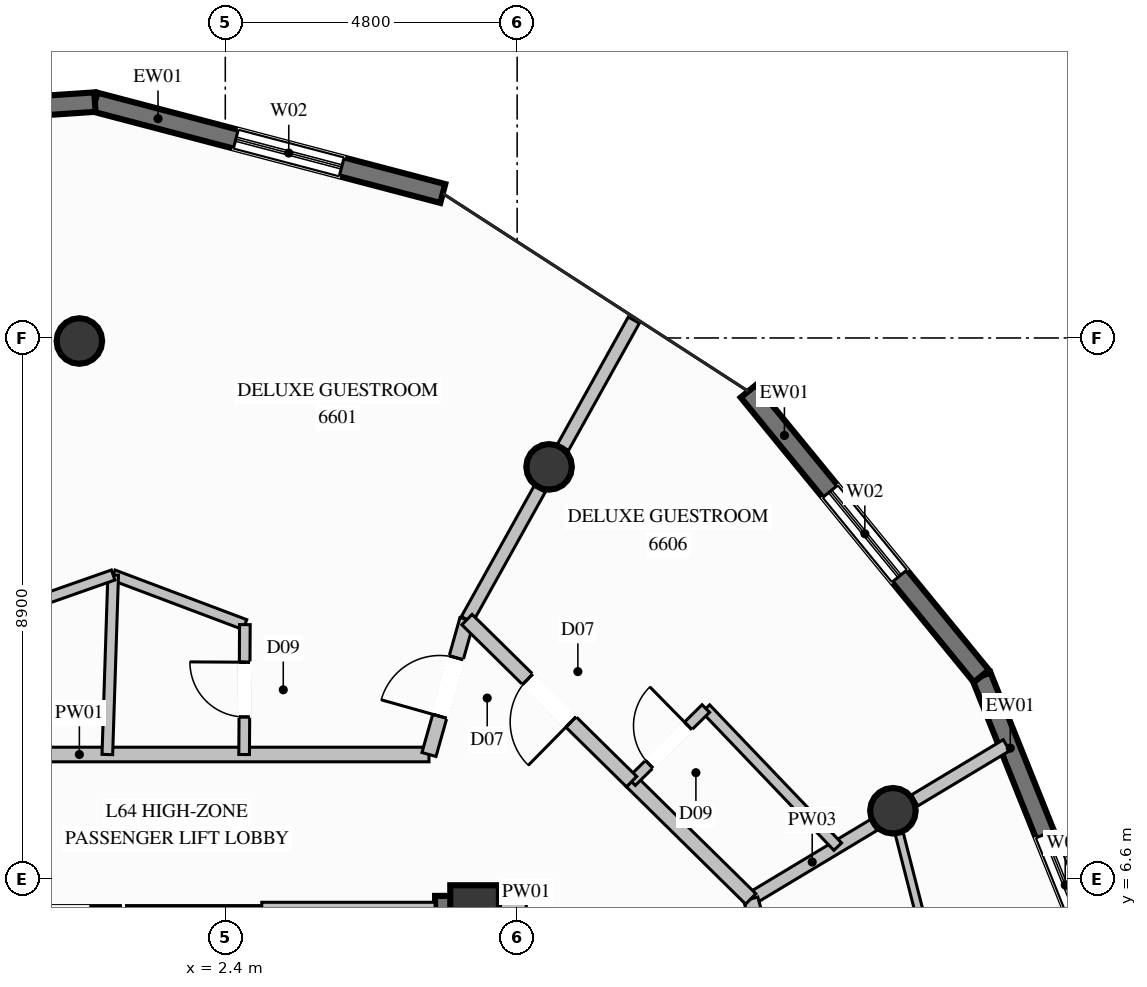
"""IFC4 building model, lengths in metres.
Left out: names, types, materials, properties, quantities, classifications, styles, units other than length and angle.
Written with IfcOpenShell. Run it as: python <this file> out.ifc"""

import sys

from ifc_helpers import new_model, si_unit, direction, frame, frame_2d, origin, origin_2d, place, context, subcontext, project, spatial, rectangle, circle, extrude, element, fill, save


model = new_model("IFC4")
c1 = context("Model", 3, precision=1e-05, world=origin(), true_north=direction((0.0, 1.0)))
c2 = subcontext(c1, "Body", "Model", "MODEL_VIEW")
j1 = project(units=[si_unit("LENGTHUNIT", "METRE"), si_unit("PLANEANGLEUNIT", "RADIAN")], contexts=[c1])
p1 = place(None, origin())
s1 = spatial("IfcSite", under=j1, at=p1, CompositionType="ELEMENT")
p2 = place(p1, origin())
s2 = spatial("IfcBuilding", under=s1, at=p2, CompositionType="ELEMENT")
p3 = place(p2, frame((0.0, 0.0, 246.8)))
s3 = spatial("IfcBuildingStorey", under=s2, at=p3, CompositionType="ELEMENT", Elevation=246.8)
p4 = place(p3, frame((6.5, 6.1, 0.0), z_axis=(0.0, 0.0, 1.0), x_axis=(1.0, 0.0, 0.0)))
e1 = element("IfcColumn", 1, at=p4, inside=s3, PredefinedType="COLUMN", context=c2, shape_type="SweptSolid", body=[
    extrude(rectangle(XDim=0.8, YDim=0.8, at=origin_2d()), origin(), (0.0, 0.0, 1.0), 3.8),
])
p5 = place(p3, frame((5.85, 6.1, 0.0), z_axis=(0.0, 0.0, 1.0), x_axis=(1.0, 0.0, 0.0)))
e2 = element("IfcWall", 2, at=p5, inside=s3, PredefinedType="SHEAR", context=c2, shape_type="SweptSolid", body=[
    extrude(rectangle(XDim=0.425, YDim=0.45, at=frame_2d((0.212, 0.0))), origin(), (0.0, 0.0, 1.0), 3.8),
])
p6 = place(p3, frame((6.5, 3.35, 0.0), z_axis=(0.0, 0.0, 1.0), x_axis=(0.0, 1.0, 0.0)))
e3 = element("IfcWall", 3, at=p6, inside=s3, PredefinedType="SHEAR", context=c2, shape_type="SweptSolid", body=[
    extrude(rectangle(XDim=2.975, YDim=0.45, at=frame_2d((1.487, 0.0))), origin(), (0.0, 0.0, 1.0), 3.8),
])
for number, where, z_axis, x_axis in (
    (4, (13.38, 7.725, 0.0), (0.0, 0.0, 1.0), (1.0, 0.0, 0.0)),
    (5, (7.725, 13.38, 0.0), (0.0, 0.0, 1.0), (1.0, 0.0, 0.0)),
    (6, (0.0, 15.45, 0.0), (0.0, 0.0, 1.0), (1.0, 0.0, 0.0)),
):
    element("IfcColumn", number, at=place(p3, frame(where, z_axis=z_axis, x_axis=x_axis)), inside=s3, PredefinedType="COLUMN", context=c2, shape_type="SweptSolid", body=[
        extrude(circle(Radius=0.375, at=origin_2d()), origin(), (0.0, 0.0, 1.0), 3.8),
    ])
p7 = place(p3, frame((14.835, 9.939, 0.0), z_axis=(0.0, 0.0, 1.0), x_axis=(0.372412492589, -0.928067311871, 0.0)))
e7 = element("IfcWall", 7, at=p7, inside=s3, PredefinedType="SOLIDWALL", context=c2, shape_type="SweptSolid", body=[
    extrude(rectangle(XDim=6.095, YDim=0.32, at=frame_2d((3.048, 0.0))), origin(), (0.0, 0.0, 1.0), 3.57),
])
p8 = place(p7, frame((2.802, 0.0, 0.35)))
e8 = element("IfcOpeningElement", 8, at=p8, cuts=e7, PredefinedType="OPENING", context=c2, shape_type="SweptSolid", body=[
    extrude(rectangle(XDim=1.8, YDim=2.6, at=frame_2d((0.9, 1.3))), frame((0.0, 0.17, 0.0), z_axis=(0.0, -1.0, 0.0), x_axis=(1.0, 0.0, 0.0)), (0.0, 0.0, 1.0), 0.34),
])
p9 = place(p3, frame((11.001, 14.623, 0.0), z_axis=(0.0, 0.0, 1.0), x_axis=(0.633391522875, -0.773831492478, 0.0)))
e9 = element("IfcWall", 9, at=p9, inside=s3, PredefinedType="SOLIDWALL", context=c2, shape_type="SweptSolid", body=[
    extrude(rectangle(XDim=6.053, YDim=0.32, at=frame_2d((3.027, 0.0))), origin(), (0.0, 0.0, 1.0), 3.57),
])
p10 = place(p9, frame((2.127, 0.0, 0.35)))
e10 = element("IfcOpeningElement", 10, at=p10, cuts=e9, PredefinedType="OPENING", context=c2, shape_type="SweptSolid", body=[
    extrude(rectangle(XDim=1.8, YDim=2.6, at=frame_2d((0.9, 1.3))), frame((0.0, 0.17, 0.0), z_axis=(0.0, -1.0, 0.0), x_axis=(1.0, 0.0, 0.0)), (0.0, 0.0, 1.0), 0.34),
])
p11 = place(p3, frame((0.256, 19.379, 0.0), z_axis=(0.0, 0.0, 1.0), x_axis=(0.967181914063, -0.254084917124, 0.0)))
e11 = element("IfcWall", 11, at=p11, inside=s3, PredefinedType="SOLIDWALL", context=c2, shape_type="SweptSolid", body=[
    extrude(rectangle(XDim=5.915, YDim=0.32, at=frame_2d((2.958, 0.0))), origin(), (0.0, 0.0, 1.0), 3.57),
])
p12 = place(p11, frame((2.396, 0.0, 0.35)))
e12 = element("IfcOpeningElement", 12, at=p12, cuts=e11, PredefinedType="OPENING", context=c2, shape_type="SweptSolid", body=[
    extrude(rectangle(XDim=1.8, YDim=2.6, at=frame_2d((0.9, 1.3))), frame((0.0, 0.17, 0.0), z_axis=(0.0, -1.0, 0.0), x_axis=(1.0, 0.0, 0.0)), (0.0, 0.0, 1.0), 0.34),
])
p13 = place(p3, frame((-5.603, 18.985, 0.0), z_axis=(0.0, 0.0, 1.0), x_axis=(0.997748955427, 0.067059838539, 0.0)))
e13 = element("IfcWall", 13, at=p13, inside=s3, PredefinedType="SOLIDWALL", context=c2, shape_type="SweptSolid", body=[
    extrude(rectangle(XDim=5.872, YDim=0.32, at=frame_2d((2.936, 0.0))), origin(), (0.0, 0.0, 1.0), 3.57),
])
p14 = place(p13, frame((2.036, 0.0, 0.35)))
e14 = element("IfcOpeningElement", 14, at=p14, cuts=e13, PredefinedType="OPENING", context=c2, shape_type="SweptSolid", body=[
    extrude(rectangle(XDim=1.8, YDim=2.6, at=frame_2d((0.9, 1.3))), frame((0.0, 0.17, 0.0), z_axis=(0.0, -1.0, 0.0), x_axis=(1.0, 0.0, 0.0)), (0.0, 0.0, 1.0), 0.34),
])
p15 = place(p3, frame((0.65, 6.0, 0.0), z_axis=(0.0, 0.0, 1.0), x_axis=(-1.0, 0.0, 0.0)))
e15 = element("IfcWall", 15, at=p15, inside=s3, PredefinedType="SOLIDWALL", context=c2, shape_type="SweptSolid", body=[
    extrude(rectangle(XDim=2.1, YDim=0.28, at=frame_2d((1.05, 0.0))), origin(), (0.0, 0.0, 1.0), 3.57),
])
p16 = place(p15, frame((0.5, 0.0, 0.0)))
e16 = element("IfcOpeningElement", 16, at=p16, cuts=e15, PredefinedType="OPENING", context=c2, shape_type="SweptSolid", body=[
    extrude(rectangle(XDim=1.1, YDim=2.2, at=frame_2d((0.55, 1.1))), frame((0.0, 0.15, 0.0), z_axis=(0.0, -1.0, 0.0), x_axis=(1.0, 0.0, 0.0)), (0.0, 0.0, 1.0), 0.3),
])
p17 = place(p3, frame((3.0, 6.0, 0.0), z_axis=(0.0, 0.0, 1.0), x_axis=(-1.0, 0.0, 0.0)))
e17 = element("IfcWall", 17, at=p17, inside=s3, PredefinedType="SOLIDWALL", context=c2, shape_type="SweptSolid", body=[
    extrude(rectangle(XDim=2.2, YDim=0.28, at=frame_2d((1.1, 0.0))), origin(), (0.0, 0.0, 1.0), 3.57),
])
p18 = place(p3, frame((-5.75, 8.65, 0.0), z_axis=(0.0, 0.0, 1.0), x_axis=(1.0, 0.0, 0.0)))
e18 = element("IfcWall", 18, at=p18, inside=s3, PredefinedType="PARTITIONING", context=c2, shape_type="SweptSolid", body=[
    extrude(rectangle(XDim=11.5, YDim=0.24, at=frame_2d((5.75, 0.0))), origin(), (0.0, 0.0, 1.0), 3.57),
])
p19 = place(p3, frame((3.0, 6.1, 0.0), z_axis=(0.0, 0.0, 1.0), x_axis=(1.0, 0.0, 0.0)))
e19 = element("IfcWall", 19, at=p19, inside=s3, PredefinedType="PARTITIONING", context=c2, shape_type="SweptSolid", body=[
    extrude(rectangle(XDim=2.85, YDim=0.24, at=frame_2d((1.425, 0.0))), origin(), (0.0, 0.0, 1.0), 2.655),
])
p20 = place(p3, frame((6.5, 6.1, 0.0), z_axis=(0.0, 0.0, 1.0), x_axis=(1.0, 0.0, 0.0)))
e20 = element("IfcWall", 20, at=p20, inside=s3, PredefinedType="PARTITIONING", context=c2, shape_type="SweptSolid", body=[
    extrude(rectangle(XDim=0.85, YDim=0.24, at=frame_2d((0.425, 0.0))), origin(), (0.0, 0.0, 1.0), 3.011),
])
p21 = place(p3, frame((11.042, 6.275, 0.0), z_axis=(0.0, 0.0, 1.0), x_axis=(0.857026686246, 0.515272024335, 0.0)))
e21 = element("IfcWall", 21, at=p21, inside=s3, PredefinedType="PARTITIONING", context=c2, shape_type="SweptSolid", body=[
    extrude(rectangle(XDim=2.358, YDim=0.21, at=frame_2d((1.179, 0.0))), origin(), (0.0, 0.0, 1.0), 3.011),
])
p22 = place(p3, frame((13.737, 7.895, 0.0), z_axis=(0.0, 0.0, 1.0), x_axis=(0.857150569961, 0.515065918514, 0.0)))
e22 = element("IfcWall", 22, at=p22, inside=s3, PredefinedType="PARTITIONING", context=c2, shape_type="SweptSolid", body=[
    extrude(rectangle(XDim=1.763, YDim=0.21, at=frame_2d((0.881, 0.0))), origin(), (0.0, 0.0, 1.0), 3.57),
])
p23 = place(p3, frame((6.375, 10.869, 0.0), z_axis=(0.0, 0.0, 1.0), x_axis=(0.486620940413, 0.873613221255, 0.0)))
e23 = element("IfcWall", 23, at=p23, inside=s3, PredefinedType="PARTITIONING", context=c2, shape_type="SweptSolid", body=[
    extrude(rectangle(XDim=2.458, YDim=0.21, at=frame_2d((1.229, 0.0))), origin(), (0.0, 0.0, 1.0), 3.011),
])
p24 = place(p3, frame((7.954, 13.702, 0.0), z_axis=(0.0, 0.0, 1.0), x_axis=(0.486456485885, 0.873704805607, 0.0)))
e24 = element("IfcWall", 24, at=p24, inside=s3, PredefinedType="PARTITIONING", context=c2, shape_type="SweptSolid", body=[
    extrude(rectangle(XDim=2.395, YDim=0.21, at=frame_2d((1.197, 0.0))), origin(), (0.0, 0.0, 1.0), 3.57),
])
p25 = place(p3, frame((0.556, 11.602, 0.0), z_axis=(0.0, 0.0, 1.0), x_axis=(0.935773181831, -0.35260254135, 0.0)))
e25 = element("IfcWall", 25, at=p25, inside=s3, PredefinedType="PLUMBINGWALL", context=c2, shape_type="SweptSolid", body=[
    extrude(rectangle(XDim=2.315, YDim=0.175, at=frame_2d((1.157, 0.0))), origin(), (0.0, 0.0, 1.0), 3.252),
])
p26 = place(p3, frame((0.556, 11.602, 0.0), z_axis=(0.0, 0.0, 1.0), x_axis=(-0.032483675207, -0.999472266171, 0.0)))
e26 = element("IfcWall", 26, at=p26, inside=s3, PredefinedType="PLUMBINGWALL", context=c2, shape_type="SweptSolid", body=[
    extrude(rectangle(XDim=2.954, YDim=0.175, at=frame_2d((1.477, 0.0))), origin(), (0.0, 0.0, 1.0), 3.57),
])
p27 = place(p3, frame((2.71, 8.65, 0.0), z_axis=(0.0, 0.0, 1.0), x_axis=(0.005600552237, 0.999984316784, 0.0)))
e27 = element("IfcWall", 27, at=p27, inside=s3, PredefinedType="PLUMBINGWALL", context=c2, shape_type="SweptSolid", body=[
    extrude(rectangle(XDim=2.136, YDim=0.175, at=frame_2d((1.068, 0.0))), origin(), (0.0, 0.0, 1.0), 3.57),
])
p28 = place(p27, frame((0.618, 0.0, 0.0)))
e28 = element("IfcOpeningElement", 28, at=p28, cuts=e27, PredefinedType="OPENING", context=c2, shape_type="SweptSolid", body=[
    extrude(rectangle(XDim=0.9, YDim=2.1, at=frame_2d((0.45, 1.05))), frame((0.0, 0.098, 0.0), z_axis=(0.0, -1.0, 0.0), x_axis=(1.0, 0.0, 0.0)), (0.0, 0.0, 1.0), 0.195),
])
p29 = place(p3, frame((5.75, 8.65, 0.0), z_axis=(0.0, 0.0, 1.0), x_axis=(0.271110513922, 0.962548226969, 0.0)))
e29 = element("IfcWall", 29, at=p29, inside=s3, PredefinedType="PARTITIONING", context=c2, shape_type="SweptSolid", body=[
    extrude(rectangle(XDim=2.305, YDim=0.24, at=frame_2d((1.153, 0.0))), origin(), (0.0, 0.0, 1.0), 3.57),
])
p30 = place(p29, frame((0.653, 0.0, 0.0)))
e30 = element("IfcOpeningElement", 30, at=p30, cuts=e29, PredefinedType="OPENING", context=c2, shape_type="SweptSolid", body=[
    extrude(rectangle(XDim=1.0, YDim=2.2, at=frame_2d((0.5, 1.1))), frame((0.0, 0.13, 0.0), z_axis=(0.0, -1.0, 0.0), x_axis=(1.0, 0.0, 0.0)), (0.0, 0.0, 1.0), 0.26),
])
p31 = place(p3, frame((-1.767, 10.786, 0.0), z_axis=(0.0, 0.0, 1.0), x_axis=(0.943463492061, 0.331476453385, 0.0)))
e31 = element("IfcWall", 31, at=p31, inside=s3, PredefinedType="PLUMBINGWALL", context=c2, shape_type="SweptSolid", body=[
    extrude(rectangle(XDim=2.462, YDim=0.175, at=frame_2d((1.231, 0.0))), origin(), (0.0, 0.0, 1.0), 3.252),
])
p32 = place(p3, frame((12.75, 0.0, 0.0), z_axis=(0.0, 0.0, 1.0), x_axis=(-0.262640884433, 0.964893655189, 0.0)))
e32 = element("IfcWall", 32, at=p32, inside=s3, PredefinedType="PARTITIONING", context=c2, shape_type="SweptSolid", body=[
    extrude(rectangle(XDim=6.503, YDim=0.24, at=frame_2d((3.251, 0.0))), origin(), (0.0, 0.0, 1.0), 3.57),
])
p33 = place(p3, frame((15.357, 0.0, 0.0), z_axis=(0.0, 0.0, 1.0), x_axis=(-0.246948201866, 0.969028681513, 0.0)))
e33 = element("IfcWall", 33, at=p33, inside=s3, PredefinedType="PARTITIONING", context=c2, shape_type="SweptSolid", body=[
    extrude(rectangle(XDim=7.937, YDim=0.135, at=frame_2d((3.968, 0.0))), origin(), (0.0, 0.0, 1.0), 3.139),
])
p34 = place(p33, frame((3.493, 0.0, 0.0)))
e34 = element("IfcOpeningElement", 34, at=p34, cuts=e33, PredefinedType="OPENING", context=c2, shape_type="SweptSolid", body=[
    extrude(rectangle(XDim=0.95, YDim=2.1, at=frame_2d((0.475, 1.05))), frame((0.0, 0.078, 0.0), z_axis=(0.0, -1.0, 0.0), x_axis=(1.0, 0.0, 0.0)), (0.0, 0.0, 1.0), 0.155),
])
p35 = place(p3, frame((11.042, 6.275, 0.0), z_axis=(0.0, 0.0, 1.0), x_axis=(-0.712677423321, 0.701491903224, 0.0)))
e35 = element("IfcWall", 35, at=p35, inside=s3, PredefinedType="PARTITIONING", context=c2, shape_type="SweptSolid", body=[
    extrude(rectangle(XDim=2.75, YDim=0.24, at=frame_2d((1.375, 0.0))), origin(), (0.0, 0.0, 1.0), 3.57),
])
p36 = place(p3, frame((12.472, 7.135, 0.0), z_axis=(0.0, 0.0, 1.0), x_axis=(-0.690671718567, 0.723168429324, 0.0)))
e36 = element("IfcWall", 36, at=p36, inside=s3, PredefinedType="PLUMBINGWALL", context=c2, shape_type="SweptSolid", body=[
    extrude(rectangle(XDim=3.14, YDim=0.175, at=frame_2d((1.57, 0.0))), origin(), (0.0, 0.0, 1.0), 3.57),
])
p37 = place(p3, frame((9.082, 8.204, 0.0), z_axis=(0.0, 0.0, 1.0), x_axis=(0.712642440828, 0.701527441751, 0.0)))
e37 = element("IfcWall", 37, at=p37, inside=s3, PredefinedType="PLUMBINGWALL", context=c2, shape_type="SweptSolid", body=[
    extrude(rectangle(XDim=1.713, YDim=0.175, at=frame_2d((0.857, 0.0))), origin(), (0.0, 0.0, 1.0), 3.57),
])
p38 = place(p37, frame((0.407, 0.0, 0.0)))
e38 = element("IfcOpeningElement", 38, at=p38, cuts=e37, PredefinedType="OPENING", context=c2, shape_type="SweptSolid", body=[
    extrude(rectangle(XDim=0.9, YDim=2.1, at=frame_2d((0.45, 1.05))), frame((0.0, 0.098, 0.0), z_axis=(0.0, -1.0, 0.0), x_axis=(1.0, 0.0, 0.0)), (0.0, 0.0, 1.0), 0.195),
])
p39 = place(p3, frame((9.082, 8.204, 0.0), z_axis=(0.0, 0.0, 1.0), x_axis=(-0.712644426178, 0.70152542494, 0.0)))
e39 = element("IfcWall", 39, at=p39, inside=s3, PredefinedType="PARTITIONING", context=c2, shape_type="SweptSolid", body=[
    extrude(rectangle(XDim=3.799, YDim=0.24, at=frame_2d((1.899, 0.0))), origin(), (0.0, 0.0, 1.0), 3.57),
])
p40 = place(p39, frame((1.399, 0.0, 0.0)))
e40 = element("IfcOpeningElement", 40, at=p40, cuts=e39, PredefinedType="OPENING", context=c2, shape_type="SweptSolid", body=[
    extrude(rectangle(XDim=1.0, YDim=2.2, at=frame_2d((0.5, 1.1))), frame((0.0, 0.13, 0.0), z_axis=(0.0, -1.0, 0.0), x_axis=(1.0, 0.0, 0.0)), (0.0, 0.0, 1.0), 0.26),
])
p41 = place(p8, origin())
e41 = element("IfcWindow", 41, at=p41, inside=s3, PartitioningType="SINGLE_PANEL", PredefinedType="WINDOW", context=c2, shape_type="SweptSolid", body=[
    extrude(rectangle(XDim=1.8, YDim=2.6, at=frame_2d((0.9, 1.3))), frame((0.0, 0.03, 0.0), z_axis=(0.0, -1.0, 0.0), x_axis=(1.0, 0.0, 0.0)), (0.0, 0.0, 1.0), 0.06),
])
fill(e8, e41)
p42 = place(p10, origin())
e42 = element("IfcWindow", 42, at=p42, inside=s3, PartitioningType="SINGLE_PANEL", PredefinedType="WINDOW", context=c2, shape_type="SweptSolid", body=[
    extrude(rectangle(XDim=1.8, YDim=2.6, at=frame_2d((0.9, 1.3))), frame((0.0, 0.03, 0.0), z_axis=(0.0, -1.0, 0.0), x_axis=(1.0, 0.0, 0.0)), (0.0, 0.0, 1.0), 0.06),
])
fill(e10, e42)
p43 = place(p12, origin())
e43 = element("IfcWindow", 43, at=p43, inside=s3, PartitioningType="SINGLE_PANEL", PredefinedType="WINDOW", context=c2, shape_type="SweptSolid", body=[
    extrude(rectangle(XDim=1.8, YDim=2.6, at=frame_2d((0.9, 1.3))), frame((0.0, 0.03, 0.0), z_axis=(0.0, -1.0, 0.0), x_axis=(1.0, 0.0, 0.0)), (0.0, 0.0, 1.0), 0.06),
])
fill(e12, e43)
p44 = place(p28, origin())
e44 = element("IfcDoor", 44, at=p44, inside=s3, OperationType="SINGLE_SWING_RIGHT", PredefinedType="DOOR", context=c2, shape_type="SweptSolid", body=[
    extrude(rectangle(XDim=0.9, YDim=2.1, at=frame_2d((0.45, 1.05))), frame((0.0, 0.025, 0.0), z_axis=(0.0, -1.0, 0.0), x_axis=(1.0, 0.0, 0.0)), (0.0, 0.0, 1.0), 0.05),
])
fill(e28, e44)
p45 = place(p30, origin())
e45 = element("IfcDoor", 45, at=p45, inside=s3, OperationType="SINGLE_SWING_LEFT", PredefinedType="DOOR", context=c2, shape_type="SweptSolid", body=[
    extrude(rectangle(XDim=1.0, YDim=2.2, at=frame_2d((0.5, 1.1))), frame((0.0, 0.025, 0.0), z_axis=(0.0, -1.0, 0.0), x_axis=(1.0, 0.0, 0.0)), (0.0, 0.0, 1.0), 0.05),
])
fill(e30, e45)
p46 = place(p38, origin())
e46 = element("IfcDoor", 46, at=p46, inside=s3, OperationType="SINGLE_SWING_RIGHT", PredefinedType="DOOR", context=c2, shape_type="SweptSolid", body=[
    extrude(rectangle(XDim=0.9, YDim=2.1, at=frame_2d((0.45, 1.05))), frame((0.0, 0.025, 0.0), z_axis=(0.0, -1.0, 0.0), x_axis=(1.0, 0.0, 0.0)), (0.0, 0.0, 1.0), 0.05),
])
fill(e38, e46)
p47 = place(p40, origin())
e47 = element("IfcDoor", 47, at=p47, inside=s3, OperationType="SINGLE_SWING_LEFT", PredefinedType="DOOR", context=c2, shape_type="SweptSolid", body=[
    extrude(rectangle(XDim=1.0, YDim=2.2, at=frame_2d((0.5, 1.1))), frame((0.0, 0.025, 0.0), z_axis=(0.0, -1.0, 0.0), x_axis=(1.0, 0.0, 0.0)), (0.0, 0.0, 1.0), 0.05),
])
fill(e40, e47)
save(model, sys.argv[1])
